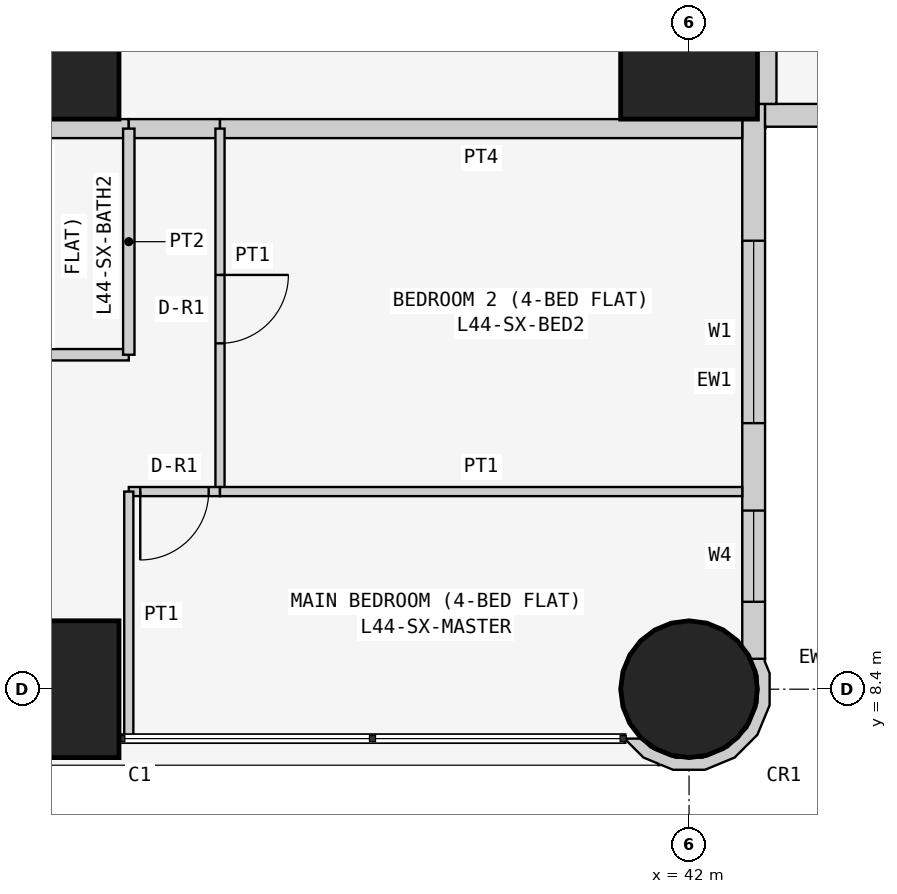
"""IFC4 building model, lengths in metres.
Left out: names, types, materials, properties, quantities, classifications, styles, units other than length and angle.
Written with IfcOpenShell. Run it as: python <this file> out.ifc"""

import sys

from ifc_helpers import new_model, si_unit, direction, frame, frame_2d, origin, origin_2d, place, context, subcontext, project, spatial, polyline, rectangle, circle, outline, extrude, element, fill, save


model = new_model("IFC4")
c1 = context("Model", 3, precision=1e-05, world=origin(), true_north=direction((0.0, 1.0)))
c2 = subcontext(c1, "Body", "Model", "MODEL_VIEW")
j1 = project(units=[si_unit("LENGTHUNIT", "METRE"), si_unit("PLANEANGLEUNIT", "RADIAN")], contexts=[c1])
p1 = place(None, origin())
s1 = spatial("IfcSite", under=j1, at=p1, CompositionType="ELEMENT")
p2 = place(p1, origin())
s2 = spatial("IfcBuilding", under=s1, at=p2, CompositionType="ELEMENT")
p3 = place(p2, frame((0.0, 0.0, 170.1)))
s3 = spatial("IfcBuildingStorey", under=s2, at=p3, CompositionType="ELEMENT", Elevation=170.1)
for number, where, z_axis, x_axis in (
    (1, (33.6, 8.4, 0.0), (0.0, 0.0, 1.0), (1.0, 0.0, 0.0)),
    (2, (33.6, 16.8, 0.0), (0.0, 0.0, 1.0), (1.0, 0.0, 0.0)),
):
    element("IfcColumn", number, at=place(p3, frame(where, z_axis=z_axis, x_axis=x_axis)), inside=s3, PredefinedType="COLUMN", context=c2, shape_type="SweptSolid", body=[
        extrude(rectangle(XDim=1.8, YDim=1.8, at=origin_2d()), origin(), (0.0, 0.0, 1.0), 3.6),
    ])
p4 = place(p3, frame((42.0, 8.4, 0.0), z_axis=(0.0, 0.0, 1.0), x_axis=(1.0, 0.0, 0.0)))
e3 = element("IfcColumn", 3, at=p4, inside=s3, PredefinedType="COLUMN", context=c2, shape_type="SweptSolid", body=[
    extrude(circle(Radius=0.9, at=origin_2d()), origin(), (0.0, 0.0, 1.0), 3.6),
])
p5 = place(p3, frame((42.0, 16.8, 0.0), z_axis=(0.0, 0.0, 1.0), x_axis=(1.0, 0.0, 0.0)))
e4 = element("IfcColumn", 4, at=p5, inside=s3, PredefinedType="COLUMN", context=c2, shape_type="SweptSolid", body=[
    extrude(rectangle(XDim=1.8, YDim=1.8, at=origin_2d()), origin(), (0.0, 0.0, 1.0), 3.6),
])
p6 = place(p3, frame((42.85, 8.8, 0.0), z_axis=(0.0, 0.0, 1.0), x_axis=(0.0, 1.0, 0.0)))
e5 = element("IfcWall", 5, at=p6, inside=s3, PredefinedType="SOLIDWALL", context=c2, shape_type="SweptSolid", body=[
    extrude(rectangle(XDim=7.3, YDim=0.3, at=frame_2d((3.65, 0.0))), origin(), (0.0, 0.0, 1.0), 3.45),
])
p7 = place(p6, frame((3.1, 0.0, 0.9)))
e6 = element("IfcOpeningElement", 6, at=p7, cuts=e5, PredefinedType="OPENING", context=c2, shape_type="SweptSolid", body=[
    extrude(rectangle(XDim=2.4, YDim=1.5, at=frame_2d((1.2, 0.75))), frame((0.0, 0.16, 0.0), z_axis=(0.0, -1.0, 0.0), x_axis=(1.0, 0.0, 0.0)), (0.0, 0.0, 1.0), 0.32),
])
p8 = place(p6, frame((0.75, 0.0, 0.9)))
e7 = element("IfcOpeningElement", 7, at=p8, cuts=e5, PredefinedType="OPENING", context=c2, shape_type="SweptSolid", body=[
    extrude(rectangle(XDim=1.2, YDim=1.5, at=frame_2d((0.6, 0.75))), frame((0.0, 0.16, 0.0), z_axis=(0.0, -1.0, 0.0), x_axis=(1.0, 0.0, 0.0)), (0.0, 0.0, 1.0), 0.32),
])
p9 = place(p3, frame((43.0, 15.95, 0.0), z_axis=(0.0, 0.0, 1.0), x_axis=(1.0, 0.0, 0.0)))
e8 = element("IfcWall", 8, at=p9, inside=s3, PredefinedType="SOLIDWALL", context=c2, shape_type="SweptSolid", body=[
    extrude(rectangle(XDim=15.4, YDim=0.3, at=frame_2d((7.7, 0.0))), origin(), (0.0, 0.0, 1.0), 3.45),
])
p10 = place(p9, frame((1.2, 0.0, 0.9)))
e9 = element("IfcOpeningElement", 9, at=p10, cuts=e8, PredefinedType="OPENING", context=c2, shape_type="SweptSolid", body=[
    extrude(rectangle(XDim=1.8, YDim=1.5, at=frame_2d((0.9, 0.75))), frame((0.0, 0.16, 0.0), z_axis=(0.0, -1.0, 0.0), x_axis=(1.0, 0.0, 0.0)), (0.0, 0.0, 1.0), 0.32),
])
p11 = place(p9, frame((4.95, 0.0, 1.5)))
e10 = element("IfcOpeningElement", 10, at=p11, cuts=e8, PredefinedType="OPENING", context=c2, shape_type="SweptSolid", body=[
    extrude(rectangle(XDim=0.9, YDim=0.7, at=frame_2d((0.45, 0.35))), frame((0.0, 0.16, 0.0), z_axis=(0.0, -1.0, 0.0), x_axis=(1.0, 0.0, 0.0)), (0.0, 0.0, 1.0), 0.32),
])
p12 = place(p9, frame((8.5, 0.0, 0.9)))
e11 = element("IfcOpeningElement", 11, at=p12, cuts=e8, PredefinedType="OPENING", context=c2, shape_type="SweptSolid", body=[
    extrude(rectangle(XDim=1.8, YDim=1.5, at=frame_2d((0.9, 0.75))), frame((0.0, 0.16, 0.0), z_axis=(0.0, -1.0, 0.0), x_axis=(1.0, 0.0, 0.0)), (0.0, 0.0, 1.0), 0.32),
])
p13 = place(p9, frame((12.5, 0.0, 0.0)))
e12 = element("IfcOpeningElement", 12, at=p13, cuts=e8, PredefinedType="OPENING", context=c2, shape_type="SweptSolid", body=[
    extrude(rectangle(XDim=0.9, YDim=2.4, at=frame_2d((0.45, 1.2))), frame((0.0, 0.16, 0.0), z_axis=(0.0, -1.0, 0.0), x_axis=(1.0, 0.0, 0.0)), (0.0, 0.0, 1.0), 0.32),
])
p14 = place(p9, frame((13.5, 0.0, 0.9)))
e13 = element("IfcOpeningElement", 13, at=p14, cuts=e8, PredefinedType="OPENING", context=c2, shape_type="SweptSolid", body=[
    extrude(rectangle(XDim=1.2, YDim=1.5, at=frame_2d((0.6, 0.75))), frame((0.0, 0.16, 0.0), z_axis=(0.0, -1.0, 0.0), x_axis=(1.0, 0.0, 0.0)), (0.0, 0.0, 1.0), 0.32),
])
p15 = place(p3, frame((41.233, 7.789, 0.0), z_axis=(0.0, 0.0, 1.0), x_axis=(0.377204953059, -0.926129809145, 0.0)))
e14 = element("IfcWall", 14, at=p15, inside=s3, PredefinedType="SOLIDWALL", context=c2, shape_type="SweptSolid", body=[
    extrude(outline(polyline([(0.319, 1.842), (-0.072, 2.002), (-0.24, 2.001), (-0.27, 2.017), (-0.37, 1.841), (-0.102, 1.842), (0.23, 1.707), (0.485, 1.455), (0.624, 1.125), (0.626, 0.766), (0.491, 0.434), (0.239, 0.179), (0.09, 0.117), (0.011, -0.078), (0.025, -0.083), (0.329, 0.045), (0.48, 0.198), (0.499, 0.193), (0.508, 0.225), (0.626, 0.345), (0.785, 0.736), (0.782, 1.157), (0.619, 1.546), (0.319, 1.842)])), origin(), (0.0, 0.0, 1.0), 3.45),
])
p16 = place(p3, frame((43.025, 22.571, 0.0), z_axis=(0.0, 0.0, 1.0), x_axis=(0.0, -1.0, 0.0)))
e15 = element("IfcWall", 15, at=p16, inside=s3, PredefinedType="PARTITIONING", context=c2, shape_type="SweptSolid", body=[
    extrude(rectangle(XDim=6.471, YDim=0.25, at=frame_2d((3.235, 0.0))), origin(), (0.0, 0.0, 1.0), 3.45),
])
p17 = place(p3, frame((34.629, 15.775, 0.0), z_axis=(0.0, 0.0, 1.0), x_axis=(-1.0, 0.0, 0.0)))
e16 = element("IfcWall", 16, at=p17, inside=s3, PredefinedType="PARTITIONING", context=c2, shape_type="SweptSolid", body=[
    extrude(rectangle(XDim=2.629, YDim=0.25, at=frame_2d((1.314, 0.0))), origin(), (0.0, 0.0, 1.0), 3.45),
])
p18 = place(p3, frame((35.829, 15.775, 0.0), z_axis=(0.0, 0.0, 1.0), x_axis=(-1.0, 0.0, 0.0)))
e17 = element("IfcWall", 17, at=p18, inside=s3, PredefinedType="PARTITIONING", context=c2, shape_type="SweptSolid", body=[
    extrude(rectangle(XDim=1.2, YDim=0.25, at=frame_2d((0.6, 0.0))), origin(), (0.0, 0.0, 1.0), 3.45),
])
p19 = place(p3, frame((42.7, 15.775, 0.0), z_axis=(0.0, 0.0, 1.0), x_axis=(-1.0, 0.0, 0.0)))
e18 = element("IfcWall", 18, at=p19, inside=s3, PredefinedType="PARTITIONING", context=c2, shape_type="SweptSolid", body=[
    extrude(rectangle(XDim=6.871, YDim=0.25, at=frame_2d((3.436, 0.0))), origin(), (0.0, 0.0, 1.0), 3.45),
])
p20 = place(p3, frame((32.0, 12.8, 0.0), z_axis=(0.0, 0.0, 1.0), x_axis=(1.0, 0.0, 0.0)))
e19 = element("IfcWall", 19, at=p20, inside=s3, PredefinedType="PARTITIONING", context=c2, shape_type="SweptSolid", body=[
    extrude(rectangle(XDim=2.629, YDim=0.15, at=frame_2d((1.314, 0.0))), origin(), (0.0, 0.0, 1.0), 3.45),
])
p21 = place(p3, frame((34.629, 12.8, 0.0), z_axis=(0.0, 0.0, 1.0), x_axis=(0.0, 1.0, 0.0)))
e20 = element("IfcWall", 20, at=p21, inside=s3, PredefinedType="PARTITIONING", context=c2, shape_type="SweptSolid", body=[
    extrude(rectangle(XDim=2.975, YDim=0.15, at=frame_2d((1.487, 0.0))), origin(), (0.0, 0.0, 1.0), 3.45),
])
p22 = place(p3, frame((35.829, 15.775, 0.0), z_axis=(0.0, 0.0, 1.0), x_axis=(0.0, -1.0, 0.0)))
e21 = element("IfcWall", 21, at=p22, inside=s3, PredefinedType="PARTITIONING", context=c2, shape_type="SweptSolid", body=[
    extrude(rectangle(XDim=4.775, YDim=0.12, at=frame_2d((2.387, 0.0))), origin(), (0.0, 0.0, 1.0), 3.45),
])
p23 = place(p22, frame((1.925, 0.0, 0.0)))
e22 = element("IfcOpeningElement", 22, at=p23, cuts=e21, PredefinedType="OPENING", context=c2, shape_type="SweptSolid", body=[
    extrude(rectangle(XDim=0.9, YDim=2.1, at=frame_2d((0.45, 1.05))), frame((0.0, 0.07, 0.0), z_axis=(0.0, -1.0, 0.0), x_axis=(1.0, 0.0, 0.0)), (0.0, 0.0, 1.0), 0.14),
])
p24 = place(p3, frame((35.829, 11.0, 0.0), z_axis=(0.0, 0.0, 1.0), x_axis=(-1.0, 0.0, 0.0)))
e23 = element("IfcWall", 23, at=p24, inside=s3, PredefinedType="PARTITIONING", context=c2, shape_type="SweptSolid", body=[
    extrude(rectangle(XDim=1.2, YDim=0.12, at=frame_2d((0.6, 0.0))), origin(), (0.0, 0.0, 1.0), 3.45),
])
p25 = place(p24, frame((0.149, 0.0, 0.0)))
e24 = element("IfcOpeningElement", 24, at=p25, cuts=e23, PredefinedType="OPENING", context=c2, shape_type="SweptSolid", body=[
    extrude(rectangle(XDim=0.9, YDim=2.1, at=frame_2d((0.45, 1.05))), frame((0.0, 0.07, 0.0), z_axis=(0.0, -1.0, 0.0), x_axis=(1.0, 0.0, 0.0)), (0.0, 0.0, 1.0), 0.14),
])
p26 = place(p3, frame((34.629, 11.0, 0.0), z_axis=(0.0, 0.0, 1.0), x_axis=(0.0, -1.0, 0.0)))
e25 = element("IfcWall", 25, at=p26, inside=s3, PredefinedType="PARTITIONING", context=c2, shape_type="SweptSolid", body=[
    extrude(rectangle(XDim=3.25, YDim=0.12, at=frame_2d((1.625, 0.0))), origin(), (0.0, 0.0, 1.0), 3.45),
])
p27 = place(p3, frame((35.829, 11.0, 0.0), z_axis=(0.0, 0.0, 1.0), x_axis=(1.0, 0.0, 0.0)))
e26 = element("IfcWall", 26, at=p27, inside=s3, PredefinedType="PARTITIONING", context=c2, shape_type="SweptSolid", body=[
    extrude(rectangle(XDim=6.871, YDim=0.12, at=frame_2d((3.436, 0.0))), origin(), (0.0, 0.0, 1.0), 3.45),
])
p28 = place(p7, origin())
e27 = element("IfcWindow", 27, at=p28, inside=s3, PartitioningType="SINGLE_PANEL", PredefinedType="WINDOW", context=c2, shape_type="SweptSolid", body=[
    extrude(rectangle(XDim=2.4, YDim=1.5, at=frame_2d((1.2, 0.75))), frame((0.0, 0.03, 0.0), z_axis=(0.0, -1.0, 0.0), x_axis=(1.0, 0.0, 0.0)), (0.0, 0.0, 1.0), 0.06),
])
fill(e6, e27)
p29 = place(p8, origin())
e28 = element("IfcWindow", 28, at=p29, inside=s3, PartitioningType="SINGLE_PANEL", PredefinedType="WINDOW", context=c2, shape_type="SweptSolid", body=[
    extrude(rectangle(XDim=1.2, YDim=1.5, at=frame_2d((0.6, 0.75))), frame((0.0, 0.03, 0.0), z_axis=(0.0, -1.0, 0.0), x_axis=(1.0, 0.0, 0.0)), (0.0, 0.0, 1.0), 0.06),
])
fill(e7, e28)
p30 = place(p23, origin())
e29 = element("IfcDoor", 29, at=p30, inside=s3, OperationType="SINGLE_SWING_LEFT", PredefinedType="DOOR", context=c2, shape_type="SweptSolid", body=[
    extrude(rectangle(XDim=0.9, YDim=2.1, at=frame_2d((0.45, 1.05))), frame((0.0, 0.025, 0.0), z_axis=(0.0, -1.0, 0.0), x_axis=(1.0, 0.0, 0.0)), (0.0, 0.0, 1.0), 0.05),
])
fill(e22, e29)
p31 = place(p25, origin())
e30 = element("IfcDoor", 30, at=p31, inside=s3, OperationType="SINGLE_SWING_RIGHT", PredefinedType="DOOR", context=c2, shape_type="SweptSolid", body=[
    extrude(rectangle(XDim=0.9, YDim=2.1, at=frame_2d((0.45, 1.05))), frame((0.0, 0.025, 0.0), z_axis=(0.0, -1.0, 0.0), x_axis=(1.0, 0.0, 0.0)), (0.0, 0.0, 1.0), 0.05),
])
fill(e24, e30)
save(model, sys.argv[1])
